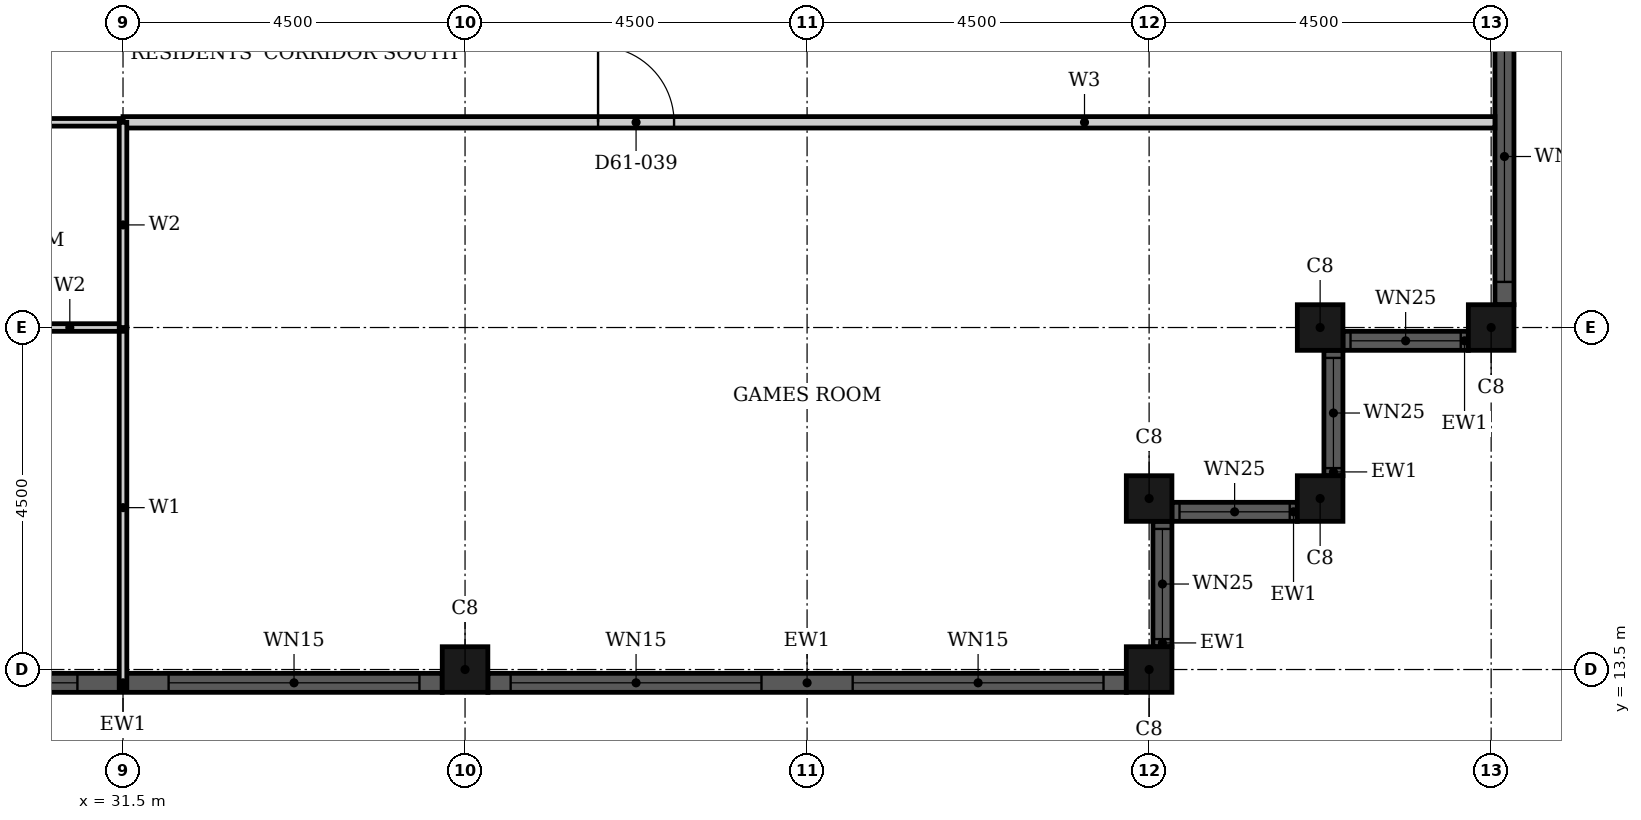
"""IFC4 building model, lengths in metres.
Left out: names, types, materials, properties, quantities, classifications, styles, units other than length and angle.
Written with IfcOpenShell. Run it as: python <this file> out.ifc"""

import sys

from ifc_helpers import new_model, si_unit, direction, frame, frame_2d, origin, origin_2d, place, context, subcontext, project, spatial, rectangle, hollow_rectangle, extrude, element, fill, save


model = new_model("IFC4")
c1 = context("Model", 3, precision=1e-05, world=origin(), true_north=direction((0.0, 1.0)))
c2 = subcontext(c1, "Body", "Model", "MODEL_VIEW")
j1 = project(units=[si_unit("LENGTHUNIT", "METRE"), si_unit("PLANEANGLEUNIT", "RADIAN")], contexts=[c1])
p1 = place(None, origin())
s1 = spatial("IfcSite", under=j1, at=p1, CompositionType="ELEMENT")
p2 = place(p1, origin())
s2 = spatial("IfcBuilding", under=s1, at=p2, CompositionType="ELEMENT")
p3 = place(p2, frame((0.0, 0.0, 241.6)))
s3 = spatial("IfcBuildingStorey", under=s2, at=p3, CompositionType="ELEMENT", Elevation=241.6)
for number, where, z_axis, x_axis in (
    (1, (36.0, 13.5, 0.0), (0.0, 0.0, 1.0), (1.0, 0.0, 0.0)),
    (2, (45.0, 13.5, 0.0), (0.0, 0.0, 1.0), (1.0, 0.0, 0.0)),
    (3, (45.0, 15.75, 0.0), (0.0, 0.0, 1.0), (1.0, 0.0, 0.0)),
    (4, (47.25, 15.75, 0.0), (0.0, 0.0, 1.0), (1.0, 0.0, 0.0)),
    (5, (47.25, 18.0, 0.0), (0.0, 0.0, 1.0), (1.0, 0.0, 0.0)),
    (6, (49.5, 18.0, 0.0), (0.0, 0.0, 1.0), (1.0, 0.0, 0.0)),
):
    element("IfcColumn", number, at=place(p3, frame(where, z_axis=z_axis, x_axis=x_axis)), inside=s3, PredefinedType="COLUMN", context=c2, shape_type="SweptSolid", body=[
        extrude(hollow_rectangle(XDim=0.6, YDim=0.6, WallThickness=0.02, at=origin_2d()), origin(), (0.0, 0.0, 1.0), 3.7),
    ])
p4 = place(p3, frame((27.3, 13.325, 0.0), z_axis=(0.0, 0.0, 1.0), x_axis=(1.0, 0.0, 0.0)))
e7 = element("IfcWall", 7, at=p4, inside=s3, PredefinedType="SOLIDWALL", context=c2, shape_type="SweptSolid", body=[
    extrude(rectangle(XDim=8.4, YDim=0.25, at=frame_2d((4.2, 0.0))), origin(), (0.0, 0.0, 1.0), 3.7),
])
p5 = place(p4, frame((0.3, 0.0, 0.45)))
e8 = element("IfcOpeningElement", 8, at=p5, cuts=e7, PredefinedType="OPENING", context=c2, shape_type="SweptSolid", body=[
    extrude(rectangle(XDim=3.3, YDim=2.3, at=frame_2d((1.65, 1.15))), frame((0.0, 0.135, 0.0), z_axis=(0.0, -1.0, 0.0), x_axis=(1.0, 0.0, 0.0)), (0.0, 0.0, 1.0), 0.27),
])
p6 = place(p4, frame((4.8, 0.0, 0.45)))
e9 = element("IfcOpeningElement", 9, at=p6, cuts=e7, PredefinedType="OPENING", context=c2, shape_type="SweptSolid", body=[
    extrude(rectangle(XDim=3.3, YDim=2.3, at=frame_2d((1.65, 1.15))), frame((0.0, 0.135, 0.0), z_axis=(0.0, -1.0, 0.0), x_axis=(1.0, 0.0, 0.0)), (0.0, 0.0, 1.0), 0.27),
])
p7 = place(p3, frame((36.3, 13.325, 0.0), z_axis=(0.0, 0.0, 1.0), x_axis=(1.0, 0.0, 0.0)))
e10 = element("IfcWall", 10, at=p7, inside=s3, PredefinedType="SOLIDWALL", context=c2, shape_type="SweptSolid", body=[
    extrude(rectangle(XDim=8.4, YDim=0.25, at=frame_2d((4.2, 0.0))), origin(), (0.0, 0.0, 1.0), 3.7),
])
p8 = place(p7, frame((0.3, 0.0, 0.45)))
e11 = element("IfcOpeningElement", 11, at=p8, cuts=e10, PredefinedType="OPENING", context=c2, shape_type="SweptSolid", body=[
    extrude(rectangle(XDim=3.3, YDim=2.3, at=frame_2d((1.65, 1.15))), frame((0.0, 0.135, 0.0), z_axis=(0.0, -1.0, 0.0), x_axis=(1.0, 0.0, 0.0)), (0.0, 0.0, 1.0), 0.27),
])
p9 = place(p7, frame((4.8, 0.0, 0.45)))
e12 = element("IfcOpeningElement", 12, at=p9, cuts=e10, PredefinedType="OPENING", context=c2, shape_type="SweptSolid", body=[
    extrude(rectangle(XDim=3.3, YDim=2.3, at=frame_2d((1.65, 1.15))), frame((0.0, 0.135, 0.0), z_axis=(0.0, -1.0, 0.0), x_axis=(1.0, 0.0, 0.0)), (0.0, 0.0, 1.0), 0.27),
])
p10 = place(p3, frame((45.175, 13.8, 0.0), z_axis=(0.0, 0.0, 1.0), x_axis=(0.0, 1.0, 0.0)))
e13 = element("IfcWall", 13, at=p10, inside=s3, PredefinedType="SOLIDWALL", context=c2, shape_type="SweptSolid", body=[
    extrude(rectangle(XDim=1.65, YDim=0.25, at=frame_2d((0.825, 0.0))), origin(), (0.0, 0.0, 1.0), 3.7),
])
p11 = place(p10, frame((0.1, 0.0, 0.9)))
e14 = element("IfcOpeningElement", 14, at=p11, cuts=e13, PredefinedType="OPENING", context=c2, shape_type="SweptSolid", body=[
    extrude(rectangle(XDim=1.45, YDim=1.85, at=frame_2d((0.725, 0.925))), frame((0.0, 0.135, 0.0), z_axis=(0.0, -1.0, 0.0), x_axis=(1.0, 0.0, 0.0)), (0.0, 0.0, 1.0), 0.27),
])
p12 = place(p3, frame((45.3, 15.575, 0.0), z_axis=(0.0, 0.0, 1.0), x_axis=(1.0, 0.0, 0.0)))
e15 = element("IfcWall", 15, at=p12, inside=s3, PredefinedType="SOLIDWALL", context=c2, shape_type="SweptSolid", body=[
    extrude(rectangle(XDim=1.65, YDim=0.25, at=frame_2d((0.825, 0.0))), origin(), (0.0, 0.0, 1.0), 3.7),
])
p13 = place(p12, frame((0.1, 0.0, 0.9)))
e16 = element("IfcOpeningElement", 16, at=p13, cuts=e15, PredefinedType="OPENING", context=c2, shape_type="SweptSolid", body=[
    extrude(rectangle(XDim=1.45, YDim=1.85, at=frame_2d((0.725, 0.925))), frame((0.0, 0.135, 0.0), z_axis=(0.0, -1.0, 0.0), x_axis=(1.0, 0.0, 0.0)), (0.0, 0.0, 1.0), 0.27),
])
p14 = place(p3, frame((47.425, 16.05, 0.0), z_axis=(0.0, 0.0, 1.0), x_axis=(0.0, 1.0, 0.0)))
e17 = element("IfcWall", 17, at=p14, inside=s3, PredefinedType="SOLIDWALL", context=c2, shape_type="SweptSolid", body=[
    extrude(rectangle(XDim=1.65, YDim=0.25, at=frame_2d((0.825, 0.0))), origin(), (0.0, 0.0, 1.0), 3.7),
])
p15 = place(p14, frame((0.1, 0.0, 0.9)))
e18 = element("IfcOpeningElement", 18, at=p15, cuts=e17, PredefinedType="OPENING", context=c2, shape_type="SweptSolid", body=[
    extrude(rectangle(XDim=1.45, YDim=1.85, at=frame_2d((0.725, 0.925))), frame((0.0, 0.135, 0.0), z_axis=(0.0, -1.0, 0.0), x_axis=(1.0, 0.0, 0.0)), (0.0, 0.0, 1.0), 0.27),
])
p16 = place(p3, frame((47.55, 17.825, 0.0), z_axis=(0.0, 0.0, 1.0), x_axis=(1.0, 0.0, 0.0)))
e19 = element("IfcWall", 19, at=p16, inside=s3, PredefinedType="SOLIDWALL", context=c2, shape_type="SweptSolid", body=[
    extrude(rectangle(XDim=1.65, YDim=0.25, at=frame_2d((0.825, 0.0))), origin(), (0.0, 0.0, 1.0), 3.7),
])
p17 = place(p16, frame((0.1, 0.0, 0.9)))
e20 = element("IfcOpeningElement", 20, at=p17, cuts=e19, PredefinedType="OPENING", context=c2, shape_type="SweptSolid", body=[
    extrude(rectangle(XDim=1.45, YDim=1.85, at=frame_2d((0.725, 0.925))), frame((0.0, 0.135, 0.0), z_axis=(0.0, -1.0, 0.0), x_axis=(1.0, 0.0, 0.0)), (0.0, 0.0, 1.0), 0.27),
])
p18 = place(p3, frame((49.675, 18.3, 0.0), z_axis=(0.0, 0.0, 1.0), x_axis=(0.0, 1.0, 0.0)))
e21 = element("IfcWall", 21, at=p18, inside=s3, PredefinedType="SOLIDWALL", context=c2, shape_type="SweptSolid", body=[
    extrude(rectangle(XDim=8.4, YDim=0.25, at=frame_2d((4.2, 0.0))), origin(), (0.0, 0.0, 1.0), 3.7),
])
p19 = place(p18, frame((0.3, 0.0, 0.45)))
e22 = element("IfcOpeningElement", 22, at=p19, cuts=e21, PredefinedType="OPENING", context=c2, shape_type="SweptSolid", body=[
    extrude(rectangle(XDim=3.3, YDim=2.3, at=frame_2d((1.65, 1.15))), frame((0.0, 0.135, 0.0), z_axis=(0.0, -1.0, 0.0), x_axis=(1.0, 0.0, 0.0)), (0.0, 0.0, 1.0), 0.27),
])
p20 = place(p18, frame((4.8, 0.0, 0.45)))
e23 = element("IfcOpeningElement", 23, at=p20, cuts=e21, PredefinedType="OPENING", context=c2, shape_type="SweptSolid", body=[
    extrude(rectangle(XDim=3.3, YDim=2.3, at=frame_2d((1.65, 1.15))), frame((0.0, 0.135, 0.0), z_axis=(0.0, -1.0, 0.0), x_axis=(1.0, 0.0, 0.0)), (0.0, 0.0, 1.0), 0.27),
])
p21 = place(p3, frame((31.5, 20.7, 0.0), z_axis=(0.0, 0.0, 1.0), x_axis=(1.0, 0.0, 0.0)))
e24 = element("IfcWall", 24, at=p21, inside=s3, PredefinedType="PARTITIONING", context=c2, shape_type="SweptSolid", body=[
    extrude(rectangle(XDim=18.05, YDim=0.15, at=frame_2d((9.025, 0.0))), origin(), (0.0, 0.0, 1.0), 3.4),
])
p22 = place(p21, frame((6.25, 0.0, 0.0)))
e25 = element("IfcOpeningElement", 25, at=p22, cuts=e24, PredefinedType="OPENING", context=c2, shape_type="SweptSolid", body=[
    extrude(rectangle(XDim=1.0, YDim=2.1, at=frame_2d((0.5, 1.05))), frame((0.0, 0.085, 0.0), z_axis=(0.0, -1.0, 0.0), x_axis=(1.0, 0.0, 0.0)), (0.0, 0.0, 1.0), 0.17),
])
p23 = place(p3, frame((31.5, 13.26, 0.0), z_axis=(0.0, 0.0, 1.0), x_axis=(0.0, 1.0, 0.0)))
e26 = element("IfcWall", 26, at=p23, inside=s3, PredefinedType="PARTITIONING", context=c2, shape_type="SweptSolid", body=[
    extrude(rectangle(XDim=4.74, YDim=0.1, at=frame_2d((2.37, 0.0))), origin(), (0.0, 0.0, 1.0), 3.4),
])
p24 = place(p3, frame((27.9, 18.0, 0.0), z_axis=(0.0, 0.0, 1.0), x_axis=(1.0, 0.0, 0.0)))
e27 = element("IfcWall", 27, at=p24, inside=s3, PredefinedType="PARTITIONING", context=c2, shape_type="SweptSolid", body=[
    extrude(rectangle(XDim=3.6, YDim=0.1, at=frame_2d((1.8, 0.0))), origin(), (0.0, 0.0, 1.0), 3.4),
])
p25 = place(p24, frame((1.4, 0.0, 0.0)))
e28 = element("IfcOpeningElement", 28, at=p25, cuts=e27, PredefinedType="OPENING", context=c2, shape_type="SweptSolid", body=[
    extrude(rectangle(XDim=0.8, YDim=2.1, at=frame_2d((0.4, 1.05))), frame((0.0, 0.06, 0.0), z_axis=(0.0, -1.0, 0.0), x_axis=(1.0, 0.0, 0.0)), (0.0, 0.0, 1.0), 0.12),
])
p26 = place(p3, frame((27.9, 20.7, 0.0), z_axis=(0.0, 0.0, 1.0), x_axis=(1.0, 0.0, 0.0)))
e29 = element("IfcWall", 29, at=p26, inside=s3, PredefinedType="PARTITIONING", context=c2, shape_type="SweptSolid", body=[
    extrude(rectangle(XDim=3.6, YDim=0.1, at=frame_2d((1.8, 0.0))), origin(), (0.0, 0.0, 1.0), 3.4),
])
p27 = place(p3, frame((31.5, 18.0, 0.0), z_axis=(0.0, 0.0, 1.0), x_axis=(0.0, 1.0, 0.0)))
e30 = element("IfcWall", 30, at=p27, inside=s3, PredefinedType="PARTITIONING", context=c2, shape_type="SweptSolid", body=[
    extrude(rectangle(XDim=2.7, YDim=0.1, at=frame_2d((1.35, 0.0))), origin(), (0.0, 0.0, 1.0), 3.4),
])
p28 = place(p5, origin())
e31 = element("IfcWindow", 31, at=p28, inside=s3, PartitioningType="SINGLE_PANEL", PredefinedType="WINDOW", context=c2, shape_type="SweptSolid", body=[
    extrude(rectangle(XDim=3.3, YDim=2.3, at=frame_2d((1.65, 1.15))), frame((0.0, 0.03, 0.0), z_axis=(0.0, -1.0, 0.0), x_axis=(1.0, 0.0, 0.0)), (0.0, 0.0, 1.0), 0.06),
])
fill(e8, e31)
p29 = place(p6, origin())
e32 = element("IfcWindow", 32, at=p29, inside=s3, PartitioningType="SINGLE_PANEL", PredefinedType="WINDOW", context=c2, shape_type="SweptSolid", body=[
    extrude(rectangle(XDim=3.3, YDim=2.3, at=frame_2d((1.65, 1.15))), frame((0.0, 0.03, 0.0), z_axis=(0.0, -1.0, 0.0), x_axis=(1.0, 0.0, 0.0)), (0.0, 0.0, 1.0), 0.06),
])
fill(e9, e32)
p30 = place(p8, origin())
e33 = element("IfcWindow", 33, at=p30, inside=s3, PartitioningType="SINGLE_PANEL", PredefinedType="WINDOW", context=c2, shape_type="SweptSolid", body=[
    extrude(rectangle(XDim=3.3, YDim=2.3, at=frame_2d((1.65, 1.15))), frame((0.0, 0.03, 0.0), z_axis=(0.0, -1.0, 0.0), x_axis=(1.0, 0.0, 0.0)), (0.0, 0.0, 1.0), 0.06),
])
fill(e11, e33)
p31 = place(p9, origin())
e34 = element("IfcWindow", 34, at=p31, inside=s3, PartitioningType="SINGLE_PANEL", PredefinedType="WINDOW", context=c2, shape_type="SweptSolid", body=[
    extrude(rectangle(XDim=3.3, YDim=2.3, at=frame_2d((1.65, 1.15))), frame((0.0, 0.03, 0.0), z_axis=(0.0, -1.0, 0.0), x_axis=(1.0, 0.0, 0.0)), (0.0, 0.0, 1.0), 0.06),
])
fill(e12, e34)
p32 = place(p11, origin())
e35 = element("IfcWindow", 35, at=p32, inside=s3, PartitioningType="SINGLE_PANEL", PredefinedType="WINDOW", context=c2, shape_type="SweptSolid", body=[
    extrude(rectangle(XDim=1.45, YDim=1.85, at=frame_2d((0.725, 0.925))), frame((0.0, 0.03, 0.0), z_axis=(0.0, -1.0, 0.0), x_axis=(1.0, 0.0, 0.0)), (0.0, 0.0, 1.0), 0.06),
])
fill(e14, e35)
p33 = place(p13, origin())
e36 = element("IfcWindow", 36, at=p33, inside=s3, PartitioningType="SINGLE_PANEL", PredefinedType="WINDOW", context=c2, shape_type="SweptSolid", body=[
    extrude(rectangle(XDim=1.45, YDim=1.85, at=frame_2d((0.725, 0.925))), frame((0.0, 0.03, 0.0), z_axis=(0.0, -1.0, 0.0), x_axis=(1.0, 0.0, 0.0)), (0.0, 0.0, 1.0), 0.06),
])
fill(e16, e36)
p34 = place(p15, origin())
e37 = element("IfcWindow", 37, at=p34, inside=s3, PartitioningType="SINGLE_PANEL", PredefinedType="WINDOW", context=c2, shape_type="SweptSolid", body=[
    extrude(rectangle(XDim=1.45, YDim=1.85, at=frame_2d((0.725, 0.925))), frame((0.0, 0.03, 0.0), z_axis=(0.0, -1.0, 0.0), x_axis=(1.0, 0.0, 0.0)), (0.0, 0.0, 1.0), 0.06),
])
fill(e18, e37)
p35 = place(p17, origin())
e38 = element("IfcWindow", 38, at=p35, inside=s3, PartitioningType="SINGLE_PANEL", PredefinedType="WINDOW", context=c2, shape_type="SweptSolid", body=[
    extrude(rectangle(XDim=1.45, YDim=1.85, at=frame_2d((0.725, 0.925))), frame((0.0, 0.03, 0.0), z_axis=(0.0, -1.0, 0.0), x_axis=(1.0, 0.0, 0.0)), (0.0, 0.0, 1.0), 0.06),
])
fill(e20, e38)
p36 = place(p19, origin())
e39 = element("IfcWindow", 39, at=p36, inside=s3, PartitioningType="SINGLE_PANEL", PredefinedType="WINDOW", context=c2, shape_type="SweptSolid", body=[
    extrude(rectangle(XDim=3.3, YDim=2.3, at=frame_2d((1.65, 1.15))), frame((0.0, 0.03, 0.0), z_axis=(0.0, -1.0, 0.0), x_axis=(1.0, 0.0, 0.0)), (0.0, 0.0, 1.0), 0.06),
])
fill(e22, e39)
p37 = place(p22, origin())
e40 = element("IfcDoor", 40, at=p37, inside=s3, OperationType="SINGLE_SWING_RIGHT", PredefinedType="DOOR", context=c2, shape_type="SweptSolid", body=[
    extrude(rectangle(XDim=1.0, YDim=2.1, at=frame_2d((0.5, 1.05))), frame((0.0, 0.025, 0.0), z_axis=(0.0, -1.0, 0.0), x_axis=(1.0, 0.0, 0.0)), (0.0, 0.0, 1.0), 0.05),
])
fill(e25, e40)
save(model, sys.argv[1])
